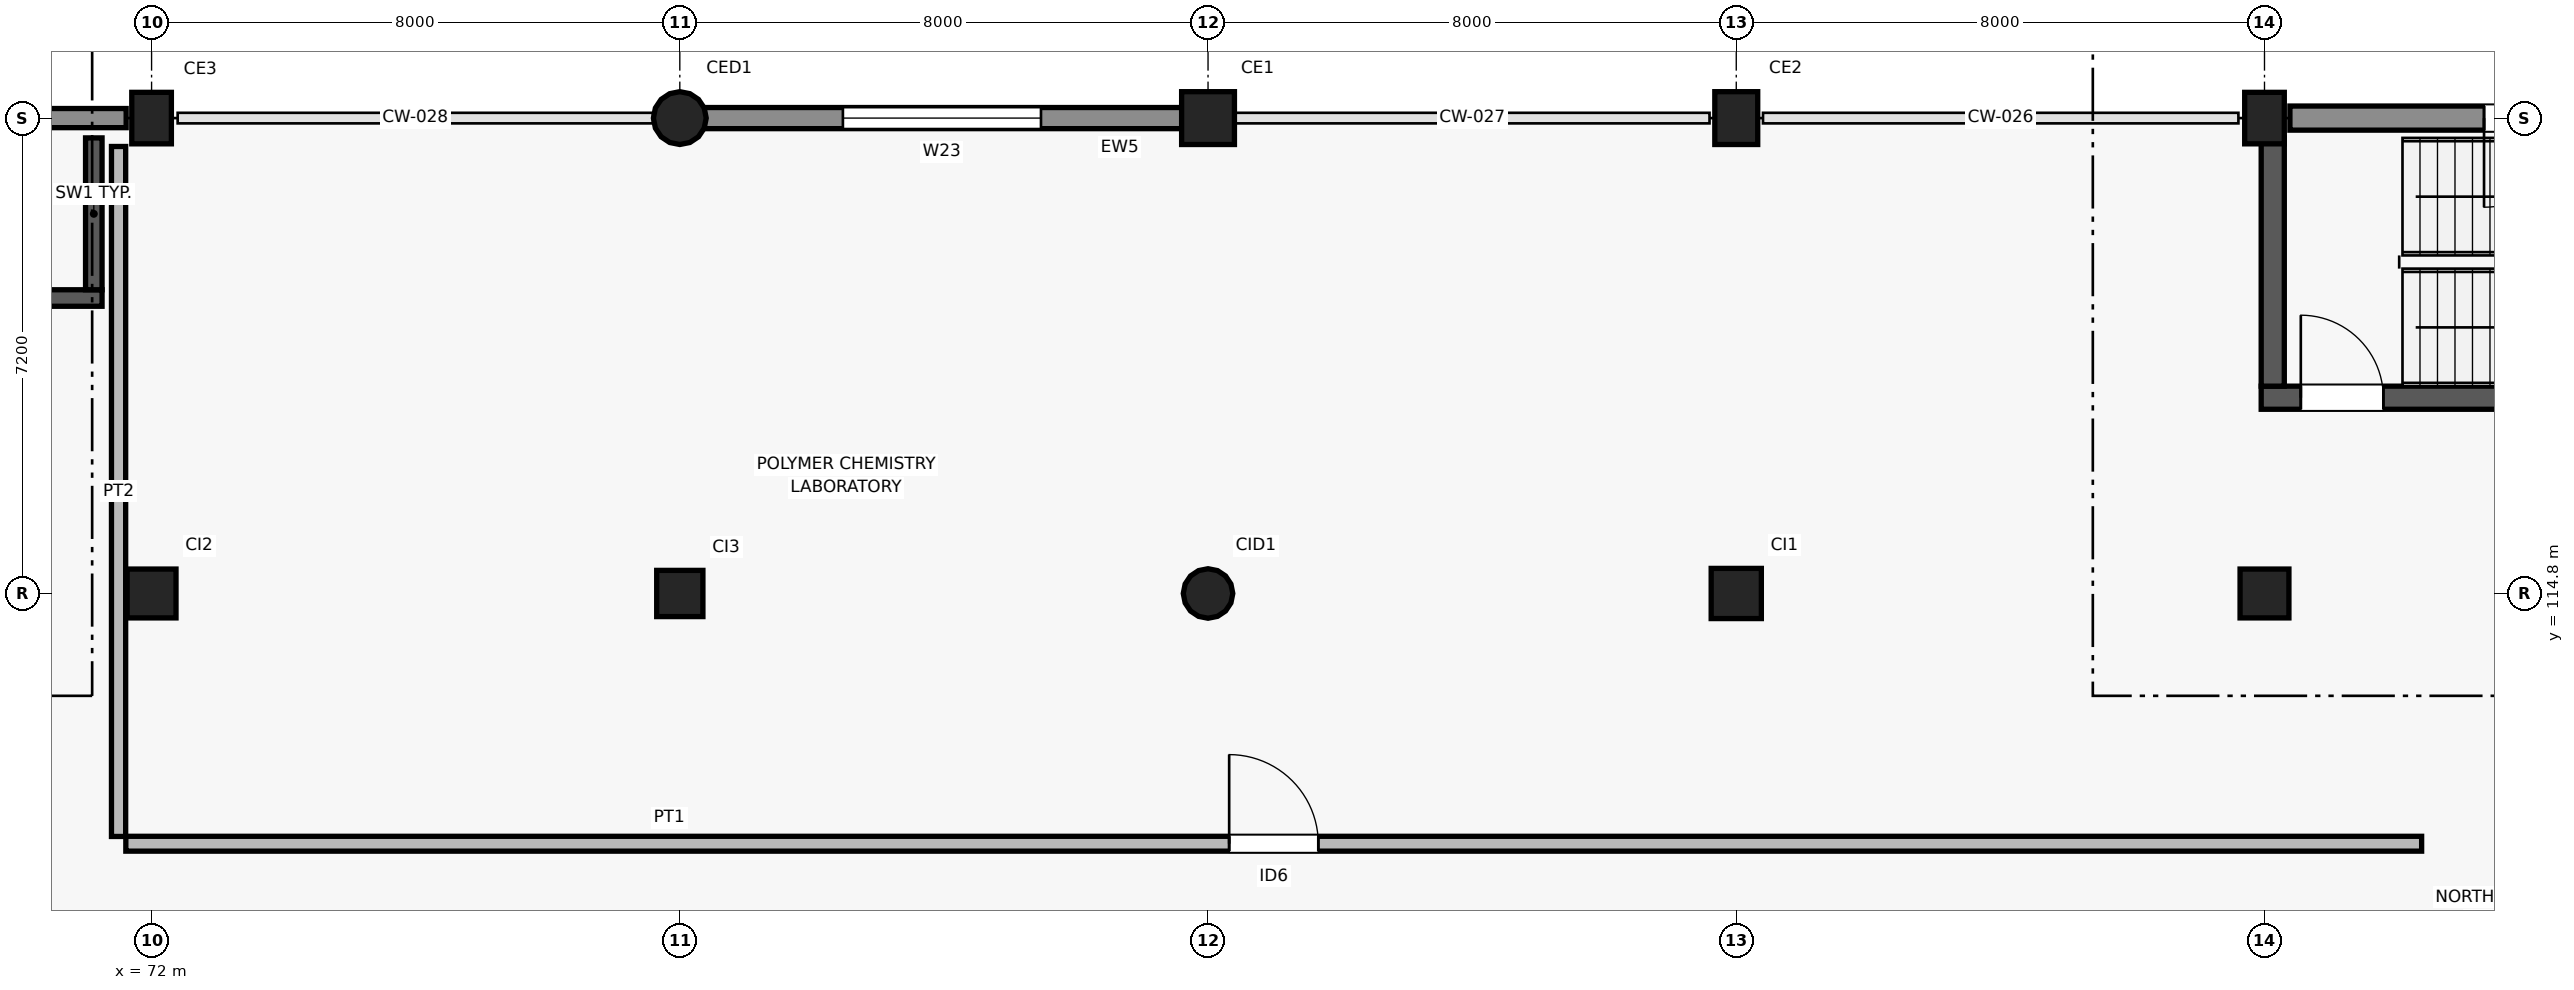
"""IFC4 building model, lengths in metres.
Left out: names, types, materials, properties, quantities, classifications, styles, units other than length and angle.
Written with IfcOpenShell. Run it as: python <this file> out.ifc"""

import sys

from ifc_helpers import new_model, si_unit, direction, frame, frame_2d, origin, origin_2d, place, context, subcontext, project, spatial, rectangle, circle, extrude, element, fill, save


model = new_model("IFC4")
c1 = context("Model", 3, precision=1e-05, world=origin(), true_north=direction((0.0, 1.0)))
c2 = subcontext(c1, "Body", "Model", "MODEL_VIEW")
j1 = project(units=[si_unit("LENGTHUNIT", "METRE"), si_unit("PLANEANGLEUNIT", "RADIAN")], contexts=[c1])
p1 = place(None, origin())
s1 = spatial("IfcSite", under=j1, at=p1, CompositionType="ELEMENT")
p2 = place(p1, origin())
s2 = spatial("IfcBuilding", under=s1, at=p2, CompositionType="ELEMENT")
p3 = place(p2, origin())
s3 = spatial("IfcBuildingStorey", under=s2, at=p3, CompositionType="ELEMENT", Elevation=0.0)
p4 = place(p3, frame((72.0, 114.8, 0.0), z_axis=(0.0, 0.0, 1.0), x_axis=(1.0, 0.0, 0.0)))
e1 = element("IfcColumn", 1, at=p4, inside=s3, PredefinedType="COLUMN", context=c2, shape_type="SweptSolid", body=[
    extrude(rectangle(XDim=0.74, YDim=0.74, at=origin_2d()), origin(), (0.0, 0.0, 1.0), 4.5),
])
p5 = place(p3, frame((72.0, 122.0, 0.0), z_axis=(0.0, 0.0, 1.0), x_axis=(1.0, 0.0, 0.0)))
e2 = element("IfcColumn", 2, at=p5, inside=s3, PredefinedType="COLUMN", context=c2, shape_type="SweptSolid", body=[
    extrude(rectangle(XDim=0.78, YDim=0.6, at=origin_2d()), origin(), (0.0, 0.0, 1.0), 4.5),
])
p6 = place(p3, frame((80.0, 114.8, 0.0), z_axis=(0.0, 0.0, 1.0), x_axis=(1.0, 0.0, 0.0)))
e3 = element("IfcColumn", 3, at=p6, inside=s3, PredefinedType="COLUMN", context=c2, shape_type="SweptSolid", body=[
    extrude(rectangle(XDim=0.7, YDim=0.7, at=origin_2d()), origin(), (0.0, 0.0, 1.0), 4.5),
])
p7 = place(p3, frame((80.0, 122.0, 0.0), z_axis=(0.0, 0.0, 1.0), x_axis=(1.0, 0.0, 0.0)))
e4 = element("IfcColumn", 4, at=p7, inside=s3, PredefinedType="COLUMN", context=c2, shape_type="SweptSolid", body=[
    extrude(circle(Radius=0.4, at=origin_2d()), origin(), (0.0, 0.0, 1.0), 4.5),
])
p8 = place(p3, frame((88.0, 114.8, 0.0), z_axis=(0.0, 0.0, 1.0), x_axis=(1.0, 0.0, 0.0)))
e5 = element("IfcColumn", 5, at=p8, inside=s3, PredefinedType="COLUMN", context=c2, shape_type="SweptSolid", body=[
    extrude(circle(Radius=0.375, at=origin_2d()), origin(), (0.0, 0.0, 1.0), 4.5),
])
p9 = place(p3, frame((88.0, 122.0, 0.0), z_axis=(0.0, 0.0, 1.0), x_axis=(1.0, 0.0, 0.0)))
e6 = element("IfcColumn", 6, at=p9, inside=s3, PredefinedType="COLUMN", context=c2, shape_type="SweptSolid", body=[
    extrude(rectangle(XDim=0.8, YDim=0.8, at=origin_2d()), origin(), (0.0, 0.0, 1.0), 4.5),
])
p10 = place(p3, frame((96.0, 114.8, 0.0), z_axis=(0.0, 0.0, 1.0), x_axis=(1.0, 0.0, 0.0)))
e7 = element("IfcColumn", 7, at=p10, inside=s3, PredefinedType="COLUMN", context=c2, shape_type="SweptSolid", body=[
    extrude(rectangle(XDim=0.76, YDim=0.76, at=origin_2d()), origin(), (0.0, 0.0, 1.0), 4.5),
])
p11 = place(p3, frame((96.0, 122.0, 0.0), z_axis=(0.0, 0.0, 1.0), x_axis=(1.0, 0.0, 0.0)))
e8 = element("IfcColumn", 8, at=p11, inside=s3, PredefinedType="COLUMN", context=c2, shape_type="SweptSolid", body=[
    extrude(rectangle(XDim=0.8, YDim=0.65, at=origin_2d()), origin(), (0.0, 0.0, 1.0), 4.5),
])
p12 = place(p3, frame((104.0, 114.8, 0.0), z_axis=(0.0, 0.0, 1.0), x_axis=(1.0, 0.0, 0.0)))
e9 = element("IfcColumn", 9, at=p12, inside=s3, PredefinedType="COLUMN", context=c2, shape_type="SweptSolid", body=[
    extrude(rectangle(XDim=0.74, YDim=0.74, at=origin_2d()), origin(), (0.0, 0.0, 1.0), 4.5),
])
p13 = place(p3, frame((104.0, 122.0, 0.0), z_axis=(0.0, 0.0, 1.0), x_axis=(1.0, 0.0, 0.0)))
e10 = element("IfcColumn", 10, at=p13, inside=s3, PredefinedType="COLUMN", context=c2, shape_type="SweptSolid", body=[
    extrude(rectangle(XDim=0.78, YDim=0.6, at=origin_2d()), origin(), (0.0, 0.0, 1.0), 4.5),
])
p14 = place(p3, frame((111.664, 122.0, 0.0), z_axis=(0.0, 0.0, 1.0), x_axis=(-1.0, 0.0, 0.0)))
e11 = element("IfcWall", 11, at=p14, inside=s3, PredefinedType="SOLIDWALL", context=c2, shape_type="SweptSolid", body=[
    extrude(rectangle(XDim=7.279, YDim=0.365, at=frame_2d((3.64, 0.0))), origin(), (0.0, 0.0, 1.0), 4.22),
])
p15 = place(p14, frame((2.989, 0.0, 0.0)))
e12 = element("IfcOpeningElement", 12, at=p15, cuts=e11, PredefinedType="OPENING", context=c2, shape_type="SweptSolid", body=[
    extrude(rectangle(XDim=1.35, YDim=2.2, at=frame_2d((0.675, 1.1))), frame((0.0, 0.192, 0.0), z_axis=(0.0, -1.0, 0.0), x_axis=(1.0, 0.0, 0.0)), (0.0, 0.0, 1.0), 0.385),
])
p16 = place(p3, frame((87.605, 122.0, 0.0), z_axis=(0.0, 0.0, 1.0), x_axis=(-1.0, 0.0, 0.0)))
e13 = element("IfcWall", 13, at=p16, inside=s3, PredefinedType="SOLIDWALL", context=c2, shape_type="SweptSolid", body=[
    extrude(rectangle(XDim=7.269, YDim=0.32, at=frame_2d((3.635, 0.0))), origin(), (0.0, 0.0, 1.0), 3.54),
])
p17 = place(p16, frame((2.135, 0.0, 0.9)))
e14 = element("IfcOpeningElement", 14, at=p17, cuts=e13, PredefinedType="OPENING", context=c2, shape_type="SweptSolid", body=[
    extrude(rectangle(XDim=3.0, YDim=1.65, at=frame_2d((1.5, 0.825))), frame((0.0, 0.17, 0.0), z_axis=(0.0, -1.0, 0.0), x_axis=(1.0, 0.0, 0.0)), (0.0, 0.0, 1.0), 0.34),
])
p18 = place(p3, frame((71.615, 122.0, 0.0), z_axis=(0.0, 0.0, 1.0), x_axis=(-1.0, 0.0, 0.0)))
e15 = element("IfcWall", 15, at=p18, inside=s3, PredefinedType="SOLIDWALL", context=c2, shape_type="SweptSolid", body=[
    extrude(rectangle(XDim=7.22, YDim=0.29, at=frame_2d((3.61, 0.0))), origin(), (0.0, 0.0, 1.0), 4.22),
])
p19 = place(p3, frame((68.75, 119.275, 0.0), z_axis=(0.0, 0.0, 1.0), x_axis=(1.0, 0.0, 0.0)))
e16 = element("IfcWall", 16, at=p19, inside=s3, PredefinedType="SHEAR", context=c2, shape_type="SweptSolid", body=[
    extrude(rectangle(XDim=2.5, YDim=0.25, at=frame_2d((1.25, 0.0))), origin(), (0.0, 0.0, 1.0), 4.22),
])
p20 = place(p19, frame((0.8, 0.0, 0.0)))
e17 = element("IfcOpeningElement", 17, at=p20, cuts=e16, PredefinedType="OPENING", context=c2, shape_type="SweptSolid", body=[
    extrude(rectangle(XDim=0.9, YDim=2.05, at=frame_2d((0.45, 1.025))), frame((0.0, 0.135, 0.0), z_axis=(0.0, -1.0, 0.0), x_axis=(1.0, 0.0, 0.0)), (0.0, 0.0, 1.0), 0.27),
])
p21 = place(p3, frame((71.125, 119.4, 0.0), z_axis=(0.0, 0.0, 1.0), x_axis=(0.0, 1.0, 0.0)))
e18 = element("IfcWall", 18, at=p21, inside=s3, PredefinedType="SHEAR", context=c2, shape_type="SweptSolid", body=[
    extrude(rectangle(XDim=2.3, YDim=0.25, at=frame_2d((1.15, 0.0))), origin(), (0.0, 0.0, 1.0), 4.22),
])
p22 = place(p3, frame((103.95, 117.765, 0.0), z_axis=(0.0, 0.0, 1.0), x_axis=(1.0, 0.0, 0.0)))
e19 = element("IfcWall", 19, at=p22, inside=s3, PredefinedType="SHEAR", context=c2, shape_type="SweptSolid", body=[
    extrude(rectangle(XDim=8.1, YDim=0.35, at=frame_2d((4.05, 0.0))), origin(), (0.0, 0.0, 1.0), 4.22),
])
p23 = place(p22, frame((0.6, 0.0, 0.0)))
e20 = element("IfcOpeningElement", 20, at=p23, cuts=e19, PredefinedType="OPENING", context=c2, shape_type="SweptSolid", body=[
    extrude(rectangle(XDim=1.25, YDim=2.2, at=frame_2d((0.625, 1.1))), frame((0.0, 0.185, 0.0), z_axis=(0.0, -1.0, 0.0), x_axis=(1.0, 0.0, 0.0)), (0.0, 0.0, 1.0), 0.37),
])
p24 = place(p3, frame((104.125, 117.94, 0.0), z_axis=(0.0, 0.0, 1.0), x_axis=(0.0, 1.0, 0.0)))
e21 = element("IfcWall", 21, at=p24, inside=s3, PredefinedType="SHEAR", context=c2, shape_type="SweptSolid", body=[
    extrude(rectangle(XDim=3.76, YDim=0.35, at=frame_2d((1.88, 0.0))), origin(), (0.0, 0.0, 1.0), 4.22),
])
p25 = place(p3, frame((71.61, 111.01, 0.0), z_axis=(0.0, 0.0, 1.0), x_axis=(1.0, 0.0, 0.0)))
e22 = element("IfcWall", 22, at=p25, inside=s3, PredefinedType="PARTITIONING", context=c2, shape_type="SweptSolid", body=[
    extrude(rectangle(XDim=34.77, YDim=0.225, at=frame_2d((17.385, 0.0))), origin(), (0.0, 0.0, 1.0), 3.76),
])
p26 = place(p25, frame((16.71, 0.0, 0.0)))
e23 = element("IfcOpeningElement", 23, at=p26, cuts=e22, PredefinedType="OPENING", context=c2, shape_type="SweptSolid", body=[
    extrude(rectangle(XDim=1.35, YDim=2.2, at=frame_2d((0.675, 1.1))), frame((0.0, 0.123, 0.0), z_axis=(0.0, -1.0, 0.0), x_axis=(1.0, 0.0, 0.0)), (0.0, 0.0, 1.0), 0.245),
])
p27 = place(p3, frame((71.5, 111.12, 0.0), z_axis=(0.0, 0.0, 1.0), x_axis=(0.0, 1.0, 0.0)))
e24 = element("IfcWall", 24, at=p27, inside=s3, PredefinedType="PARTITIONING", context=c2, shape_type="SweptSolid", body=[
    extrude(rectangle(XDim=10.45, YDim=0.215, at=frame_2d((5.225, 0.0))), origin(), (0.0, 0.0, 1.0), 4.2),
])
p28 = place(p15, frame((1.35, 0.0, 0.0), z_axis=(0.0, 0.0, 1.0), x_axis=(-1.0, 0.0, 0.0)))
e25 = element("IfcDoor", 25, at=p28, inside=s3, OperationType="SINGLE_SWING_RIGHT", PredefinedType="DOOR", context=c2, shape_type="SweptSolid", body=[
    extrude(rectangle(XDim=1.35, YDim=2.2, at=frame_2d((0.675, 1.1))), frame((0.0, 0.025, 0.0), z_axis=(0.0, -1.0, 0.0), x_axis=(1.0, 0.0, 0.0)), (0.0, 0.0, 1.0), 0.05),
])
fill(e12, e25)
p29 = place(p17, origin())
e26 = element("IfcWindow", 26, at=p29, inside=s3, PartitioningType="SINGLE_PANEL", PredefinedType="WINDOW", context=c2, shape_type="SweptSolid", body=[
    extrude(rectangle(XDim=3.0, YDim=1.65, at=frame_2d((1.5, 0.825))), frame((0.0, 0.03, 0.0), z_axis=(0.0, -1.0, 0.0), x_axis=(1.0, 0.0, 0.0)), (0.0, 0.0, 1.0), 0.06),
])
fill(e14, e26)
p30 = place(p23, origin())
e27 = element("IfcDoor", 27, at=p30, inside=s3, OperationType="SINGLE_SWING_LEFT", PredefinedType="DOOR", context=c2, shape_type="SweptSolid", body=[
    extrude(rectangle(XDim=1.25, YDim=2.2, at=frame_2d((0.625, 1.1))), frame((0.0, 0.025, 0.0), z_axis=(0.0, -1.0, 0.0), x_axis=(1.0, 0.0, 0.0)), (0.0, 0.0, 1.0), 0.05),
])
fill(e20, e27)
p31 = place(p26, origin())
e28 = element("IfcDoor", 28, at=p31, inside=s3, OperationType="SINGLE_SWING_LEFT", PredefinedType="DOOR", context=c2, shape_type="SweptSolid", body=[
    extrude(rectangle(XDim=1.35, YDim=2.2, at=frame_2d((0.675, 1.1))), frame((0.0, 0.025, 0.0), z_axis=(0.0, -1.0, 0.0), x_axis=(1.0, 0.0, 0.0)), (0.0, 0.0, 1.0), 0.05),
])
fill(e23, e28)
save(model, sys.argv[1])
